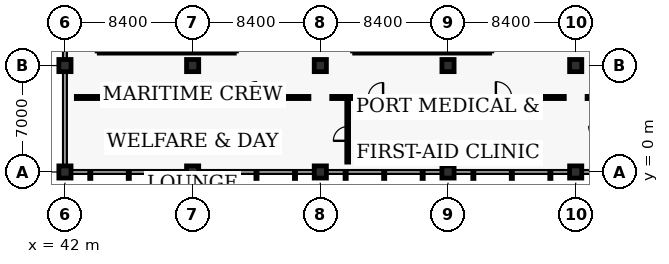
"""IFC4 building model, lengths in metres.
Left out: names, types, materials, properties, quantities, classifications, styles, units other than length and angle.
Written with IfcOpenShell. Run it as: python <this file> out.ifc"""

import sys

from ifc_helpers import new_model, si_unit, direction, frame, frame_2d, origin, origin_2d, place, context, subcontext, project, spatial, rectangle, extrude, element, fill, save


model = new_model("IFC4")
c1 = context("Model", 3, precision=1e-05, world=origin(), true_north=direction((0.0, 1.0)))
c2 = subcontext(c1, "Body", "Model", "MODEL_VIEW")
j1 = project(units=[si_unit("LENGTHUNIT", "METRE"), si_unit("PLANEANGLEUNIT", "RADIAN")], contexts=[c1])
p1 = place(None, origin())
s1 = spatial("IfcSite", under=j1, at=p1, CompositionType="ELEMENT")
p2 = place(p1, origin())
s2 = spatial("IfcBuilding", under=s1, at=p2, CompositionType="ELEMENT")
p3 = place(p2, frame((0.0, 0.0, 5.44)))
s3 = spatial("IfcBuildingStorey", under=s2, at=p3, CompositionType="ELEMENT", Elevation=5.44)
for number, where, z_axis, x_axis in (
    (1, (42.0, 0.0, 0.0), (0.0, 0.0, 1.0), (1.0, 0.0, 0.0)),
    (2, (42.0, 7.0, 0.0), (0.0, 0.0, 1.0), (1.0, 0.0, 0.0)),
    (3, (50.4, 0.0, 0.0), (0.0, 0.0, 1.0), (1.0, 0.0, 0.0)),
    (4, (50.4, 7.0, 0.0), (0.0, 0.0, 1.0), (1.0, 0.0, 0.0)),
    (5, (58.8, 0.0, 0.0), (0.0, 0.0, 1.0), (1.0, 0.0, 0.0)),
    (6, (58.8, 7.0, 0.0), (0.0, 0.0, 1.0), (1.0, 0.0, 0.0)),
    (7, (67.2, 0.0, 0.0), (0.0, 0.0, 1.0), (1.0, 0.0, 0.0)),
    (8, (67.2, 7.0, 0.0), (0.0, 0.0, 1.0), (1.0, 0.0, 0.0)),
    (9, (75.6, 0.0, 0.0), (0.0, 0.0, 1.0), (1.0, 0.0, 0.0)),
    (10, (75.6, 7.0, 0.0), (0.0, 0.0, 1.0), (1.0, 0.0, 0.0)),
):
    element("IfcColumn", number, at=place(p3, frame(where, z_axis=z_axis, x_axis=x_axis)), inside=s3, PredefinedType="COLUMN", context=c2, shape_type="SweptSolid", body=[
        extrude(rectangle(XDim=0.8, YDim=0.8, at=origin_2d()), origin(), (0.0, 0.0, 1.0), 4.16),
    ])
for number, where, z_axis, x_axis in (
    (11, (44.26, 7.96, 0.0), (0.0, 0.0, 1.0), (1.0, 0.0, 0.0)),
    (12, (61.06, 7.96, 0.0), (0.0, 0.0, 1.0), (1.0, 0.0, 0.0)),
):
    element("IfcWall", number, at=place(p3, frame(where, z_axis=z_axis, x_axis=x_axis)), inside=s3, PredefinedType="SHEAR", context=c2, shape_type="SweptSolid", body=[
        extrude(rectangle(XDim=8.88, YDim=0.28, at=frame_2d((4.44, 0.0))), origin(), (0.0, 0.0, 1.0), 4.16),
    ])
p4 = place(p3, frame((42.75, 4.9, 0.0), z_axis=(0.0, 0.0, 1.0), x_axis=(1.0, 0.0, 0.0)))
e13 = element("IfcWall", 13, at=p4, inside=s3, PredefinedType="PARTITIONING", context=c2, shape_type="SweptSolid", body=[
    extrude(rectangle(XDim=6.9, YDim=0.14, at=frame_2d((3.45, 0.0))), origin(), (0.0, 0.0, 1.0), 2.55),
])
p5 = place(p4, frame((2.4, 0.0, 0.0)))
e14 = element("IfcOpeningElement", 14, at=p5, cuts=e13, PredefinedType="OPENING", context=c2, shape_type="SweptSolid", body=[
    extrude(rectangle(XDim=0.98, YDim=2.12, at=frame_2d((0.49, 1.06))), frame((0.0, 0.08, 0.0), z_axis=(0.0, -1.0, 0.0), x_axis=(1.0, 0.0, 0.0)), (0.0, 0.0, 1.0), 0.16),
])
p6 = place(p3, frame((51.15, 4.9, 0.0), z_axis=(0.0, 0.0, 1.0), x_axis=(1.0, 0.0, 0.0)))
e15 = element("IfcWall", 15, at=p6, inside=s3, PredefinedType="PARTITIONING", context=c2, shape_type="SweptSolid", body=[
    extrude(rectangle(XDim=6.9, YDim=0.14, at=frame_2d((3.45, 0.0))), origin(), (0.0, 0.0, 1.0), 2.55),
])
p7 = place(p6, frame((2.4, 0.0, 0.0)))
e16 = element("IfcOpeningElement", 16, at=p7, cuts=e15, PredefinedType="OPENING", context=c2, shape_type="SweptSolid", body=[
    extrude(rectangle(XDim=1.04, YDim=2.14, at=frame_2d((0.52, 1.07))), frame((0.0, 0.08, 0.0), z_axis=(0.0, -1.0, 0.0), x_axis=(1.0, 0.0, 0.0)), (0.0, 0.0, 1.0), 0.16),
])
p8 = place(p3, frame((59.55, 4.9, 0.0), z_axis=(0.0, 0.0, 1.0), x_axis=(1.0, 0.0, 0.0)))
e17 = element("IfcWall", 17, at=p8, inside=s3, PredefinedType="PARTITIONING", context=c2, shape_type="SweptSolid", body=[
    extrude(rectangle(XDim=6.9, YDim=0.14, at=frame_2d((3.45, 0.0))), origin(), (0.0, 0.0, 1.0), 2.55),
])
p9 = place(p8, frame((2.4, 0.0, 0.0)))
e18 = element("IfcOpeningElement", 18, at=p9, cuts=e17, PredefinedType="OPENING", context=c2, shape_type="SweptSolid", body=[
    extrude(rectangle(XDim=0.98, YDim=2.12, at=frame_2d((0.49, 1.06))), frame((0.0, 0.08, 0.0), z_axis=(0.0, -1.0, 0.0), x_axis=(1.0, 0.0, 0.0)), (0.0, 0.0, 1.0), 0.16),
])
p10 = place(p3, frame((60.6, 0.65, 0.0), z_axis=(0.0, 0.0, 1.0), x_axis=(0.0, 1.0, 0.0)))
e19 = element("IfcWall", 19, at=p10, inside=s3, PredefinedType="PARTITIONING", context=c2, shape_type="SweptSolid", body=[
    extrude(rectangle(XDim=4.1, YDim=0.12, at=frame_2d((2.05, 0.0))), origin(), (0.0, 0.0, 1.0), 2.5),
])
p11 = place(p10, frame((1.4, 0.0, 0.0)))
e20 = element("IfcOpeningElement", 20, at=p11, cuts=e19, PredefinedType="OPENING", context=c2, shape_type="SweptSolid", body=[
    extrude(rectangle(XDim=0.94, YDim=2.08, at=frame_2d((0.47, 1.04))), frame((0.0, 0.07, 0.0), z_axis=(0.0, -1.0, 0.0), x_axis=(1.0, 0.0, 0.0)), (0.0, 0.0, 1.0), 0.14),
])
p12 = place(p3, frame((67.95, 4.9, 0.0), z_axis=(0.0, 0.0, 1.0), x_axis=(1.0, 0.0, 0.0)))
e21 = element("IfcWall", 21, at=p12, inside=s3, PredefinedType="PARTITIONING", context=c2, shape_type="SweptSolid", body=[
    extrude(rectangle(XDim=6.9, YDim=0.14, at=frame_2d((3.45, 0.0))), origin(), (0.0, 0.0, 1.0), 2.55),
])
p13 = place(p12, frame((2.4, 0.0, 0.0)))
e22 = element("IfcOpeningElement", 22, at=p13, cuts=e21, PredefinedType="OPENING", context=c2, shape_type="SweptSolid", body=[
    extrude(rectangle(XDim=1.04, YDim=2.14, at=frame_2d((0.52, 1.07))), frame((0.0, 0.08, 0.0), z_axis=(0.0, -1.0, 0.0), x_axis=(1.0, 0.0, 0.0)), (0.0, 0.0, 1.0), 0.16),
])
p14 = place(p3, frame((76.35, 4.9, 0.0), z_axis=(0.0, 0.0, 1.0), x_axis=(1.0, 0.0, 0.0)))
e23 = element("IfcWall", 23, at=p14, inside=s3, PredefinedType="PARTITIONING", context=c2, shape_type="SweptSolid", body=[
    extrude(rectangle(XDim=6.9, YDim=0.14, at=frame_2d((3.45, 0.0))), origin(), (0.0, 0.0, 1.0), 2.55),
])
p15 = place(p14, frame((2.4, 0.0, 0.0)))
e24 = element("IfcOpeningElement", 24, at=p15, cuts=e23, PredefinedType="OPENING", context=c2, shape_type="SweptSolid", body=[
    extrude(rectangle(XDim=0.98, YDim=2.12, at=frame_2d((0.49, 1.06))), frame((0.0, 0.08, 0.0), z_axis=(0.0, -1.0, 0.0), x_axis=(1.0, 0.0, 0.0)), (0.0, 0.0, 1.0), 0.16),
])
p16 = place(p5, origin())
e25 = element("IfcDoor", 25, at=p16, inside=s3, OperationType="SINGLE_SWING_RIGHT", PredefinedType="DOOR", context=c2, shape_type="SweptSolid", body=[
    extrude(rectangle(XDim=0.98, YDim=2.12, at=frame_2d((0.49, 1.06))), frame((0.0, 0.025, 0.0), z_axis=(0.0, -1.0, 0.0), x_axis=(1.0, 0.0, 0.0)), (0.0, 0.0, 1.0), 0.05),
])
fill(e14, e25)
p17 = place(p7, origin())
e26 = element("IfcDoor", 26, at=p17, inside=s3, OperationType="SINGLE_SWING_RIGHT", PredefinedType="DOOR", context=c2, shape_type="SweptSolid", body=[
    extrude(rectangle(XDim=1.04, YDim=2.14, at=frame_2d((0.52, 1.07))), frame((0.0, 0.025, 0.0), z_axis=(0.0, -1.0, 0.0), x_axis=(1.0, 0.0, 0.0)), (0.0, 0.0, 1.0), 0.05),
])
fill(e16, e26)
p18 = place(p9, origin())
e27 = element("IfcDoor", 27, at=p18, inside=s3, OperationType="SINGLE_SWING_RIGHT", PredefinedType="DOOR", context=c2, shape_type="SweptSolid", body=[
    extrude(rectangle(XDim=0.98, YDim=2.12, at=frame_2d((0.49, 1.06))), frame((0.0, 0.025, 0.0), z_axis=(0.0, -1.0, 0.0), x_axis=(1.0, 0.0, 0.0)), (0.0, 0.0, 1.0), 0.05),
])
fill(e18, e27)
p19 = place(p11, origin())
e28 = element("IfcDoor", 28, at=p19, inside=s3, OperationType="SINGLE_SWING_LEFT", PredefinedType="DOOR", context=c2, shape_type="SweptSolid", body=[
    extrude(rectangle(XDim=0.94, YDim=2.08, at=frame_2d((0.47, 1.04))), frame((0.0, 0.025, 0.0), z_axis=(0.0, -1.0, 0.0), x_axis=(1.0, 0.0, 0.0)), (0.0, 0.0, 1.0), 0.05),
])
fill(e20, e28)
p20 = place(p13, origin())
e29 = element("IfcDoor", 29, at=p20, inside=s3, OperationType="SINGLE_SWING_LEFT", PredefinedType="DOOR", context=c2, shape_type="SweptSolid", body=[
    extrude(rectangle(XDim=1.04, YDim=2.14, at=frame_2d((0.52, 1.07))), frame((0.0, 0.025, 0.0), z_axis=(0.0, -1.0, 0.0), x_axis=(1.0, 0.0, 0.0)), (0.0, 0.0, 1.0), 0.05),
])
fill(e22, e29)
save(model, sys.argv[1])
